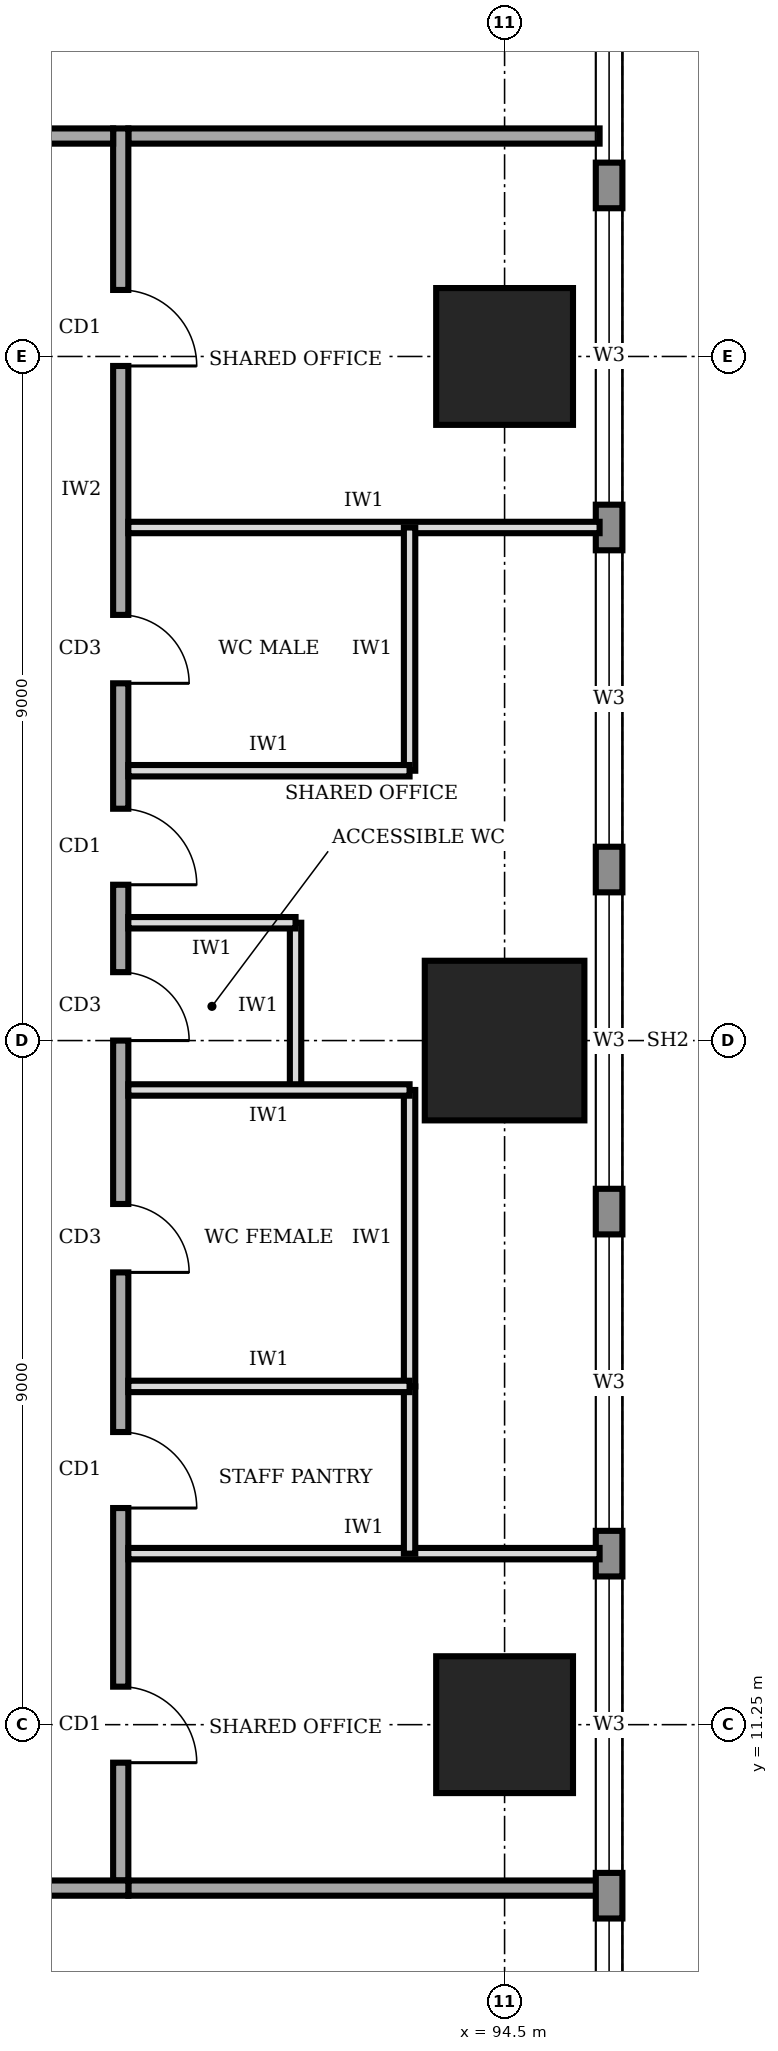
"""IFC4 building model, lengths in metres.
Left out: names, types, materials, properties, quantities, classifications, styles, units other than length and angle.
Written with IfcOpenShell. Run it as: python <this file> out.ifc"""

import sys

from ifc_helpers import new_model, si_unit, direction, frame, frame_2d, origin, origin_2d, place, context, subcontext, project, spatial, rectangle, extrude, element, fill, save


model = new_model("IFC4")
c1 = context("Model", 3, precision=1e-05, world=origin(), true_north=direction((0.0, 1.0)))
c2 = subcontext(c1, "Body", "Model", "MODEL_VIEW")
j1 = project(units=[si_unit("LENGTHUNIT", "METRE"), si_unit("PLANEANGLEUNIT", "RADIAN")], contexts=[c1])
p1 = place(None, origin())
s1 = spatial("IfcSite", under=j1, at=p1, CompositionType="ELEMENT")
p2 = place(p1, origin())
s2 = spatial("IfcBuilding", under=s1, at=p2, CompositionType="ELEMENT")
p3 = place(p2, frame((0.0, 0.0, 185.0)))
s3 = spatial("IfcBuildingStorey", under=s2, at=p3, CompositionType="ELEMENT", Elevation=185.0)
p4 = place(p3, frame((94.5, 11.25, 0.0), z_axis=(0.0, 0.0, 1.0), x_axis=(1.0, 0.0, 0.0)))
e1 = element("IfcColumn", 1, at=p4, inside=s3, PredefinedType="COLUMN", context=c2, shape_type="SweptSolid", body=[
    extrude(rectangle(XDim=1.8, YDim=1.8, at=origin_2d()), origin(), (0.0, 0.0, 1.0), 4.0),
])
p5 = place(p3, frame((94.5, 20.25, 0.0), z_axis=(0.0, 0.0, 1.0), x_axis=(1.0, 0.0, 0.0)))
e2 = element("IfcColumn", 2, at=p5, inside=s3, PredefinedType="COLUMN", context=c2, shape_type="SweptSolid", body=[
    extrude(rectangle(XDim=2.1, YDim=2.1, at=origin_2d()), origin(), (0.0, 0.0, 1.0), 4.0),
])
p6 = place(p3, frame((94.5, 29.25, 0.0), z_axis=(0.0, 0.0, 1.0), x_axis=(1.0, 0.0, 0.0)))
e3 = element("IfcColumn", 3, at=p6, inside=s3, PredefinedType="COLUMN", context=c2, shape_type="SweptSolid", body=[
    extrude(rectangle(XDim=1.8, YDim=1.8, at=origin_2d()), origin(), (0.0, 0.0, 1.0), 4.0),
])
p7 = place(p3, frame((95.875, 3.32, 0.0), z_axis=(0.0, 0.0, 1.0), x_axis=(0.0, 1.0, 0.0)))
e4 = element("IfcWall", 4, at=p7, inside=s3, PredefinedType="STANDARD", context=c2, shape_type="SweptSolid", body=[
    extrude(rectangle(XDim=33.86, YDim=0.35, at=frame_2d((16.93, 0.0))), origin(), (0.0, 0.0, 1.0), 3.75),
])
p8 = place(p7, frame((1.48, 0.0, 0.95)))
e5 = element("IfcOpeningElement", 5, at=p8, cuts=e4, PredefinedType="OPENING", context=c2, shape_type="SweptSolid", body=[
    extrude(rectangle(XDim=3.9, YDim=1.8, at=frame_2d((1.95, 0.9))), frame((0.0, 0.185, 0.0), z_axis=(0.0, -1.0, 0.0), x_axis=(1.0, 0.0, 0.0)), (0.0, 0.0, 1.0), 0.37),
])
p9 = place(p7, frame((5.98, 0.0, 0.95)))
e6 = element("IfcOpeningElement", 6, at=p9, cuts=e4, PredefinedType="OPENING", context=c2, shape_type="SweptSolid", body=[
    extrude(rectangle(XDim=3.9, YDim=1.8, at=frame_2d((1.95, 0.9))), frame((0.0, 0.185, 0.0), z_axis=(0.0, -1.0, 0.0), x_axis=(1.0, 0.0, 0.0)), (0.0, 0.0, 1.0), 0.37),
])
p10 = place(p7, frame((10.48, 0.0, 0.95)))
e7 = element("IfcOpeningElement", 7, at=p10, cuts=e4, PredefinedType="OPENING", context=c2, shape_type="SweptSolid", body=[
    extrude(rectangle(XDim=3.9, YDim=1.8, at=frame_2d((1.95, 0.9))), frame((0.0, 0.185, 0.0), z_axis=(0.0, -1.0, 0.0), x_axis=(1.0, 0.0, 0.0)), (0.0, 0.0, 1.0), 0.37),
])
p11 = place(p7, frame((14.98, 0.0, 0.95)))
e8 = element("IfcOpeningElement", 8, at=p11, cuts=e4, PredefinedType="OPENING", context=c2, shape_type="SweptSolid", body=[
    extrude(rectangle(XDim=3.9, YDim=1.8, at=frame_2d((1.95, 0.9))), frame((0.0, 0.185, 0.0), z_axis=(0.0, -1.0, 0.0), x_axis=(1.0, 0.0, 0.0)), (0.0, 0.0, 1.0), 0.37),
])
p12 = place(p7, frame((19.48, 0.0, 0.95)))
e9 = element("IfcOpeningElement", 9, at=p12, cuts=e4, PredefinedType="OPENING", context=c2, shape_type="SweptSolid", body=[
    extrude(rectangle(XDim=3.9, YDim=1.8, at=frame_2d((1.95, 0.9))), frame((0.0, 0.185, 0.0), z_axis=(0.0, -1.0, 0.0), x_axis=(1.0, 0.0, 0.0)), (0.0, 0.0, 1.0), 0.37),
])
p13 = place(p7, frame((23.98, 0.0, 0.95)))
e10 = element("IfcOpeningElement", 10, at=p13, cuts=e4, PredefinedType="OPENING", context=c2, shape_type="SweptSolid", body=[
    extrude(rectangle(XDim=3.9, YDim=1.8, at=frame_2d((1.95, 0.9))), frame((0.0, 0.185, 0.0), z_axis=(0.0, -1.0, 0.0), x_axis=(1.0, 0.0, 0.0)), (0.0, 0.0, 1.0), 0.37),
])
p14 = place(p7, frame((28.48, 0.0, 0.95)))
e11 = element("IfcOpeningElement", 11, at=p14, cuts=e4, PredefinedType="OPENING", context=c2, shape_type="SweptSolid", body=[
    extrude(rectangle(XDim=3.9, YDim=1.8, at=frame_2d((1.95, 0.9))), frame((0.0, 0.185, 0.0), z_axis=(0.0, -1.0, 0.0), x_axis=(1.0, 0.0, 0.0)), (0.0, 0.0, 1.0), 0.37),
])
p15 = place(p3, frame((72.65, 9.1, 0.0), z_axis=(0.0, 0.0, 1.0), x_axis=(1.0, 0.0, 0.0)))
e12 = element("IfcWall", 12, at=p15, inside=s3, PredefinedType="SOLIDWALL", context=c2, shape_type="SweptSolid", body=[
    extrude(rectangle(XDim=16.9, YDim=0.2, at=frame_2d((8.45, 0.0))), origin(), (0.0, 0.0, 1.0), 3.75),
])
p16 = place(p15, frame((1.325, 0.0, 0.0)))
e13 = element("IfcOpeningElement", 13, at=p16, cuts=e12, PredefinedType="OPENING", context=c2, shape_type="SweptSolid", body=[
    extrude(rectangle(XDim=1.0, YDim=2.1, at=frame_2d((0.5, 1.05))), frame((0.0, 0.11, 0.0), z_axis=(0.0, -1.0, 0.0), x_axis=(1.0, 0.0, 0.0)), (0.0, 0.0, 1.0), 0.22),
])
p17 = place(p15, frame((9.475, 0.0, 0.0)))
e14 = element("IfcOpeningElement", 14, at=p17, cuts=e12, PredefinedType="OPENING", context=c2, shape_type="SweptSolid", body=[
    extrude(rectangle(XDim=1.8, YDim=2.1, at=frame_2d((0.9, 1.05))), frame((0.0, 0.11, 0.0), z_axis=(0.0, -1.0, 0.0), x_axis=(1.0, 0.0, 0.0)), (0.0, 0.0, 1.0), 0.22),
])
p18 = place(p3, frame((89.45, 9.2, 0.0), z_axis=(0.0, 0.0, 1.0), x_axis=(0.0, 1.0, 0.0)))
e15 = element("IfcWall", 15, at=p18, inside=s3, PredefinedType="SOLIDWALL", context=c2, shape_type="SweptSolid", body=[
    extrude(rectangle(XDim=23.05, YDim=0.2, at=frame_2d((11.525, 0.0))), origin(), (0.0, 0.0, 1.0), 3.75),
])
p19 = place(p18, frame((1.55, 0.0, 0.0)))
e16 = element("IfcOpeningElement", 16, at=p19, cuts=e15, PredefinedType="OPENING", context=c2, shape_type="SweptSolid", body=[
    extrude(rectangle(XDim=1.0, YDim=2.1, at=frame_2d((0.5, 1.05))), frame((0.0, 0.11, 0.0), z_axis=(0.0, -1.0, 0.0), x_axis=(1.0, 0.0, 0.0)), (0.0, 0.0, 1.0), 0.22),
])
p20 = place(p18, frame((4.9, 0.0, 0.0)))
e17 = element("IfcOpeningElement", 17, at=p20, cuts=e15, PredefinedType="OPENING", context=c2, shape_type="SweptSolid", body=[
    extrude(rectangle(XDim=1.0, YDim=2.1, at=frame_2d((0.5, 1.05))), frame((0.0, 0.11, 0.0), z_axis=(0.0, -1.0, 0.0), x_axis=(1.0, 0.0, 0.0)), (0.0, 0.0, 1.0), 0.22),
])
p21 = place(p18, frame((8.0, 0.0, 0.0)))
e18 = element("IfcOpeningElement", 18, at=p21, cuts=e15, PredefinedType="OPENING", context=c2, shape_type="SweptSolid", body=[
    extrude(rectangle(XDim=0.9, YDim=2.1, at=frame_2d((0.45, 1.05))), frame((0.0, 0.11, 0.0), z_axis=(0.0, -1.0, 0.0), x_axis=(1.0, 0.0, 0.0)), (0.0, 0.0, 1.0), 0.22),
])
p22 = place(p18, frame((11.05, 0.0, 0.0)))
e19 = element("IfcOpeningElement", 19, at=p22, cuts=e15, PredefinedType="OPENING", context=c2, shape_type="SweptSolid", body=[
    extrude(rectangle(XDim=0.9, YDim=2.1, at=frame_2d((0.45, 1.05))), frame((0.0, 0.11, 0.0), z_axis=(0.0, -1.0, 0.0), x_axis=(1.0, 0.0, 0.0)), (0.0, 0.0, 1.0), 0.22),
])
p23 = place(p18, frame((15.75, 0.0, 0.0)))
e20 = element("IfcOpeningElement", 20, at=p23, cuts=e15, PredefinedType="OPENING", context=c2, shape_type="SweptSolid", body=[
    extrude(rectangle(XDim=0.9, YDim=2.1, at=frame_2d((0.45, 1.05))), frame((0.0, 0.11, 0.0), z_axis=(0.0, -1.0, 0.0), x_axis=(1.0, 0.0, 0.0)), (0.0, 0.0, 1.0), 0.22),
])
p24 = place(p18, frame((13.1, 0.0, 0.0)))
e21 = element("IfcOpeningElement", 21, at=p24, cuts=e15, PredefinedType="OPENING", context=c2, shape_type="SweptSolid", body=[
    extrude(rectangle(XDim=1.0, YDim=2.1, at=frame_2d((0.5, 1.05))), frame((0.0, 0.11, 0.0), z_axis=(0.0, -1.0, 0.0), x_axis=(1.0, 0.0, 0.0)), (0.0, 0.0, 1.0), 0.22),
])
p25 = place(p18, frame((19.925, 0.0, 0.0)))
e22 = element("IfcOpeningElement", 22, at=p25, cuts=e15, PredefinedType="OPENING", context=c2, shape_type="SweptSolid", body=[
    extrude(rectangle(XDim=1.0, YDim=2.1, at=frame_2d((0.5, 1.05))), frame((0.0, 0.11, 0.0), z_axis=(0.0, -1.0, 0.0), x_axis=(1.0, 0.0, 0.0)), (0.0, 0.0, 1.0), 0.22),
])
p26 = place(p3, frame((89.35, 32.15, 0.0), z_axis=(0.0, 0.0, 1.0), x_axis=(-1.0, 0.0, 0.0)))
e23 = element("IfcWall", 23, at=p26, inside=s3, PredefinedType="SOLIDWALL", context=c2, shape_type="SweptSolid", body=[
    extrude(rectangle(XDim=16.9, YDim=0.2, at=frame_2d((8.45, 0.0))), origin(), (0.0, 0.0, 1.0), 3.75),
])
p27 = place(p26, frame((3.575, 0.0, 0.0)))
e24 = element("IfcOpeningElement", 24, at=p27, cuts=e23, PredefinedType="OPENING", context=c2, shape_type="SweptSolid", body=[
    extrude(rectangle(XDim=1.0, YDim=2.1, at=frame_2d((0.5, 1.05))), frame((0.0, 0.11, 0.0), z_axis=(0.0, -1.0, 0.0), x_axis=(1.0, 0.0, 0.0)), (0.0, 0.0, 1.0), 0.22),
])
for number, where, z_axis, x_axis in (
    (25, (89.55, 9.1, 0.0), (0.0, 0.0, 1.0), (1.0, 0.0, 0.0)),
    (26, (89.55, 32.15, 0.0), (0.0, 0.0, 1.0), (1.0, 0.0, 0.0)),
):
    element("IfcWall", number, at=place(p3, frame(where, z_axis=z_axis, x_axis=x_axis)), inside=s3, PredefinedType="SOLIDWALL", context=c2, shape_type="SweptSolid", body=[
        extrude(rectangle(XDim=6.2, YDim=0.2, at=frame_2d((3.1, 0.0))), origin(), (0.0, 0.0, 1.0), 3.75),
    ])
for number, where, z_axis, x_axis in (
    (27, (89.55, 13.5, 0.0), (0.0, 0.0, 1.0), (1.0, 0.0, 0.0)),
    (28, (89.55, 27.0, 0.0), (0.0, 0.0, 1.0), (1.0, 0.0, 0.0)),
):
    element("IfcWall", number, at=place(p3, frame(where, z_axis=z_axis, x_axis=x_axis)), inside=s3, PredefinedType="PARTITIONING", context=c2, shape_type="SweptSolid", body=[
        extrude(rectangle(XDim=6.2, YDim=0.15, at=frame_2d((3.1, 0.0))), origin(), (0.0, 0.0, 1.0), 3.75),
    ])
p28 = place(p3, frame((89.55, 15.7, 0.0), z_axis=(0.0, 0.0, 1.0), x_axis=(1.0, 0.0, 0.0)))
e29 = element("IfcWall", 29, at=p28, inside=s3, PredefinedType="PARTITIONING", context=c2, shape_type="SweptSolid", body=[
    extrude(rectangle(XDim=3.7, YDim=0.15, at=frame_2d((1.85, 0.0))), origin(), (0.0, 0.0, 1.0), 3.75),
])
p29 = place(p3, frame((89.55, 19.6, 0.0), z_axis=(0.0, 0.0, 1.0), x_axis=(1.0, 0.0, 0.0)))
e30 = element("IfcWall", 30, at=p29, inside=s3, PredefinedType="PARTITIONING", context=c2, shape_type="SweptSolid", body=[
    extrude(rectangle(XDim=3.7, YDim=0.15, at=frame_2d((1.85, 0.0))), origin(), (0.0, 0.0, 1.0), 2.85),
])
p30 = place(p3, frame((89.55, 21.8, 0.0), z_axis=(0.0, 0.0, 1.0), x_axis=(1.0, 0.0, 0.0)))
e31 = element("IfcWall", 31, at=p30, inside=s3, PredefinedType="PARTITIONING", context=c2, shape_type="SweptSolid", body=[
    extrude(rectangle(XDim=2.2, YDim=0.15, at=frame_2d((1.1, 0.0))), origin(), (0.0, 0.0, 1.0), 3.75),
])
p31 = place(p3, frame((89.55, 23.8, 0.0), z_axis=(0.0, 0.0, 1.0), x_axis=(1.0, 0.0, 0.0)))
e32 = element("IfcWall", 32, at=p31, inside=s3, PredefinedType="PARTITIONING", context=c2, shape_type="SweptSolid", body=[
    extrude(rectangle(XDim=3.7, YDim=0.15, at=frame_2d((1.85, 0.0))), origin(), (0.0, 0.0, 1.0), 3.75),
])
p32 = place(p3, frame((93.25, 13.5, 0.0), z_axis=(0.0, 0.0, 1.0), x_axis=(0.0, 1.0, 0.0)))
e33 = element("IfcWall", 33, at=p32, inside=s3, PredefinedType="PARTITIONING", context=c2, shape_type="SweptSolid", body=[
    extrude(rectangle(XDim=2.2, YDim=0.15, at=frame_2d((1.1, 0.0))), origin(), (0.0, 0.0, 1.0), 3.75),
])
p33 = place(p3, frame((93.25, 15.7, 0.0), z_axis=(0.0, 0.0, 1.0), x_axis=(0.0, 1.0, 0.0)))
e34 = element("IfcWall", 34, at=p33, inside=s3, PredefinedType="PARTITIONING", context=c2, shape_type="SweptSolid", body=[
    extrude(rectangle(XDim=3.9, YDim=0.15, at=frame_2d((1.95, 0.0))), origin(), (0.0, 0.0, 1.0), 3.75),
])
p34 = place(p3, frame((91.75, 19.6, 0.0), z_axis=(0.0, 0.0, 1.0), x_axis=(0.0, 1.0, 0.0)))
e35 = element("IfcWall", 35, at=p34, inside=s3, PredefinedType="PARTITIONING", context=c2, shape_type="SweptSolid", body=[
    extrude(rectangle(XDim=2.2, YDim=0.15, at=frame_2d((1.1, 0.0))), origin(), (0.0, 0.0, 1.0), 3.75),
])
p35 = place(p3, frame((93.25, 23.8, 0.0), z_axis=(0.0, 0.0, 1.0), x_axis=(0.0, 1.0, 0.0)))
e36 = element("IfcWall", 36, at=p35, inside=s3, PredefinedType="PARTITIONING", context=c2, shape_type="SweptSolid", body=[
    extrude(rectangle(XDim=3.2, YDim=0.15, at=frame_2d((1.6, 0.0))), origin(), (0.0, 0.0, 1.0), 3.75),
])
p36 = place(p8, origin())
e37 = element("IfcWindow", 37, at=p36, inside=s3, PartitioningType="SINGLE_PANEL", PredefinedType="WINDOW", context=c2, shape_type="SweptSolid", body=[
    extrude(rectangle(XDim=3.9, YDim=1.8, at=frame_2d((1.95, 0.9))), frame((0.0, 0.03, 0.0), z_axis=(0.0, -1.0, 0.0), x_axis=(1.0, 0.0, 0.0)), (0.0, 0.0, 1.0), 0.06),
])
fill(e5, e37)
p37 = place(p9, origin())
e38 = element("IfcWindow", 38, at=p37, inside=s3, PartitioningType="SINGLE_PANEL", PredefinedType="WINDOW", context=c2, shape_type="SweptSolid", body=[
    extrude(rectangle(XDim=3.9, YDim=1.8, at=frame_2d((1.95, 0.9))), frame((0.0, 0.03, 0.0), z_axis=(0.0, -1.0, 0.0), x_axis=(1.0, 0.0, 0.0)), (0.0, 0.0, 1.0), 0.06),
])
fill(e6, e38)
p38 = place(p10, origin())
e39 = element("IfcWindow", 39, at=p38, inside=s3, PartitioningType="SINGLE_PANEL", PredefinedType="WINDOW", context=c2, shape_type="SweptSolid", body=[
    extrude(rectangle(XDim=3.9, YDim=1.8, at=frame_2d((1.95, 0.9))), frame((0.0, 0.03, 0.0), z_axis=(0.0, -1.0, 0.0), x_axis=(1.0, 0.0, 0.0)), (0.0, 0.0, 1.0), 0.06),
])
fill(e7, e39)
p39 = place(p11, origin())
e40 = element("IfcWindow", 40, at=p39, inside=s3, PartitioningType="SINGLE_PANEL", PredefinedType="WINDOW", context=c2, shape_type="SweptSolid", body=[
    extrude(rectangle(XDim=3.9, YDim=1.8, at=frame_2d((1.95, 0.9))), frame((0.0, 0.03, 0.0), z_axis=(0.0, -1.0, 0.0), x_axis=(1.0, 0.0, 0.0)), (0.0, 0.0, 1.0), 0.06),
])
fill(e8, e40)
p40 = place(p12, origin())
e41 = element("IfcWindow", 41, at=p40, inside=s3, PartitioningType="SINGLE_PANEL", PredefinedType="WINDOW", context=c2, shape_type="SweptSolid", body=[
    extrude(rectangle(XDim=3.9, YDim=1.8, at=frame_2d((1.95, 0.9))), frame((0.0, 0.03, 0.0), z_axis=(0.0, -1.0, 0.0), x_axis=(1.0, 0.0, 0.0)), (0.0, 0.0, 1.0), 0.06),
])
fill(e9, e41)
p41 = place(p13, origin())
e42 = element("IfcWindow", 42, at=p41, inside=s3, PartitioningType="SINGLE_PANEL", PredefinedType="WINDOW", context=c2, shape_type="SweptSolid", body=[
    extrude(rectangle(XDim=3.9, YDim=1.8, at=frame_2d((1.95, 0.9))), frame((0.0, 0.03, 0.0), z_axis=(0.0, -1.0, 0.0), x_axis=(1.0, 0.0, 0.0)), (0.0, 0.0, 1.0), 0.06),
])
fill(e10, e42)
p42 = place(p14, origin())
e43 = element("IfcWindow", 43, at=p42, inside=s3, PartitioningType="SINGLE_PANEL", PredefinedType="WINDOW", context=c2, shape_type="SweptSolid", body=[
    extrude(rectangle(XDim=3.9, YDim=1.8, at=frame_2d((1.95, 0.9))), frame((0.0, 0.03, 0.0), z_axis=(0.0, -1.0, 0.0), x_axis=(1.0, 0.0, 0.0)), (0.0, 0.0, 1.0), 0.06),
])
fill(e11, e43)
p43 = place(p19, frame((1.0, 0.0, 0.0), z_axis=(0.0, 0.0, 1.0), x_axis=(-1.0, 0.0, 0.0)))
e44 = element("IfcDoor", 44, at=p43, inside=s3, OperationType="SINGLE_SWING_RIGHT", PredefinedType="DOOR", context=c2, shape_type="SweptSolid", body=[
    extrude(rectangle(XDim=1.0, YDim=2.1, at=frame_2d((0.5, 1.05))), frame((0.0, 0.025, 0.0), z_axis=(0.0, -1.0, 0.0), x_axis=(1.0, 0.0, 0.0)), (0.0, 0.0, 1.0), 0.05),
])
fill(e16, e44)
p44 = place(p20, frame((1.0, 0.0, 0.0), z_axis=(0.0, 0.0, 1.0), x_axis=(-1.0, 0.0, 0.0)))
e45 = element("IfcDoor", 45, at=p44, inside=s3, OperationType="SINGLE_SWING_RIGHT", PredefinedType="DOOR", context=c2, shape_type="SweptSolid", body=[
    extrude(rectangle(XDim=1.0, YDim=2.1, at=frame_2d((0.5, 1.05))), frame((0.0, 0.025, 0.0), z_axis=(0.0, -1.0, 0.0), x_axis=(1.0, 0.0, 0.0)), (0.0, 0.0, 1.0), 0.05),
])
fill(e17, e45)
p45 = place(p21, frame((0.9, 0.0, 0.0), z_axis=(0.0, 0.0, 1.0), x_axis=(-1.0, 0.0, 0.0)))
e46 = element("IfcDoor", 46, at=p45, inside=s3, OperationType="SINGLE_SWING_RIGHT", PredefinedType="DOOR", context=c2, shape_type="SweptSolid", body=[
    extrude(rectangle(XDim=0.9, YDim=2.1, at=frame_2d((0.45, 1.05))), frame((0.0, 0.025, 0.0), z_axis=(0.0, -1.0, 0.0), x_axis=(1.0, 0.0, 0.0)), (0.0, 0.0, 1.0), 0.05),
])
fill(e18, e46)
p46 = place(p22, frame((0.9, 0.0, 0.0), z_axis=(0.0, 0.0, 1.0), x_axis=(-1.0, 0.0, 0.0)))
e47 = element("IfcDoor", 47, at=p46, inside=s3, OperationType="SINGLE_SWING_RIGHT", PredefinedType="DOOR", context=c2, shape_type="SweptSolid", body=[
    extrude(rectangle(XDim=0.9, YDim=2.1, at=frame_2d((0.45, 1.05))), frame((0.0, 0.025, 0.0), z_axis=(0.0, -1.0, 0.0), x_axis=(1.0, 0.0, 0.0)), (0.0, 0.0, 1.0), 0.05),
])
fill(e19, e47)
p47 = place(p23, frame((0.9, 0.0, 0.0), z_axis=(0.0, 0.0, 1.0), x_axis=(-1.0, 0.0, 0.0)))
e48 = element("IfcDoor", 48, at=p47, inside=s3, OperationType="SINGLE_SWING_RIGHT", PredefinedType="DOOR", context=c2, shape_type="SweptSolid", body=[
    extrude(rectangle(XDim=0.9, YDim=2.1, at=frame_2d((0.45, 1.05))), frame((0.0, 0.025, 0.0), z_axis=(0.0, -1.0, 0.0), x_axis=(1.0, 0.0, 0.0)), (0.0, 0.0, 1.0), 0.05),
])
fill(e20, e48)
p48 = place(p24, frame((1.0, 0.0, 0.0), z_axis=(0.0, 0.0, 1.0), x_axis=(-1.0, 0.0, 0.0)))
e49 = element("IfcDoor", 49, at=p48, inside=s3, OperationType="SINGLE_SWING_RIGHT", PredefinedType="DOOR", context=c2, shape_type="SweptSolid", body=[
    extrude(rectangle(XDim=1.0, YDim=2.1, at=frame_2d((0.5, 1.05))), frame((0.0, 0.025, 0.0), z_axis=(0.0, -1.0, 0.0), x_axis=(1.0, 0.0, 0.0)), (0.0, 0.0, 1.0), 0.05),
])
fill(e21, e49)
p49 = place(p25, frame((1.0, 0.0, 0.0), z_axis=(0.0, 0.0, 1.0), x_axis=(-1.0, 0.0, 0.0)))
e50 = element("IfcDoor", 50, at=p49, inside=s3, OperationType="SINGLE_SWING_RIGHT", PredefinedType="DOOR", context=c2, shape_type="SweptSolid", body=[
    extrude(rectangle(XDim=1.0, YDim=2.1, at=frame_2d((0.5, 1.05))), frame((0.0, 0.025, 0.0), z_axis=(0.0, -1.0, 0.0), x_axis=(1.0, 0.0, 0.0)), (0.0, 0.0, 1.0), 0.05),
])
fill(e22, e50)
save(model, sys.argv[1])
